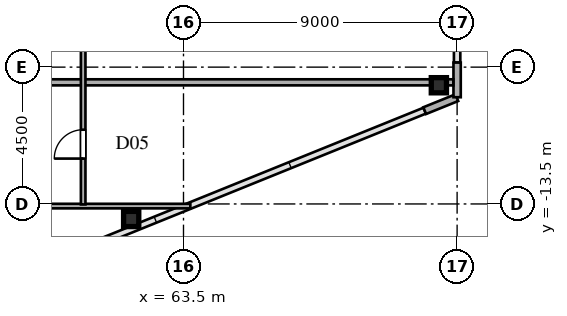
"""IFC4 building model, lengths in metres.
Left out: names, types, materials, properties, quantities, classifications, styles, units other than length and angle.
Written with IfcOpenShell. Run it as: python <this file> out.ifc"""

import sys

from ifc_helpers import new_model, si_unit, direction, frame, frame_2d, origin, origin_2d, place, context, subcontext, project, spatial, rectangle, hollow_rectangle, extrude, source, transform, mapped, element, fill, save


model = new_model("IFC4")
c1 = context("Model", 3, precision=1e-05, world=origin(), true_north=direction((0.0, 1.0)))
c2 = subcontext(c1, "Body", "Model", "MODEL_VIEW")
j1 = project(units=[si_unit("LENGTHUNIT", "METRE"), si_unit("PLANEANGLEUNIT", "RADIAN")], contexts=[c1])
p1 = place(None, origin())
s1 = spatial("IfcSite", under=j1, at=p1, CompositionType="ELEMENT")
p2 = place(p1, origin())
s2 = spatial("IfcBuilding", under=s1, at=p2, CompositionType="ELEMENT")
p3 = place(p2, frame((0.0, 0.0, 18.9)))
s3 = spatial("IfcBuildingStorey", under=s2, at=p3, CompositionType="ELEMENT", Elevation=18.9)
m1 = source(origin(), c2, "Body", "SweptSolid", [
    extrude(hollow_rectangle(XDim=0.5, YDim=0.5, WallThickness=0.02, at=origin_2d()), origin(), (0.0, 0.0, 1.0), 3.6),
])
for number, where, z_axis, x_axis in (
    (1, (71.9, -9.596, 0.0), (0.0, 0.0, 1.0), (1.0, 0.0, 0.0)),
    (2, (61.779, -13.994, 0.0), (0.0, 0.0, 1.0), (1.0, 0.0, 0.0)),
):
    element("IfcColumn", number, at=place(p3, frame(where, z_axis=z_axis, x_axis=x_axis)), inside=s3, PredefinedType="COLUMN", context=c2, shape_type="MappedRepresentation", body=[
        mapped(m1, transform((0.0, 0.0, 0.0), scale=1.0)),
    ])
for number, where, z_axis, x_axis in (
    (3, (71.434, -10.431, 0.0), (0.0, 0.0, 1.0), (0.927, 0.375, 0.0)),
    (4, (72.5, -9.99, 0.0), (0.0, 0.0, 1.0), (0.0, 1.0, 0.0)),
):
    element("IfcWall", number, at=place(p3, frame(where, z_axis=z_axis, x_axis=x_axis)), inside=s3, PredefinedType="SOLIDWALL", context=c2, shape_type="SweptSolid", body=[
        extrude(rectangle(XDim=1.14, YDim=0.24, at=frame_2d((0.57, 0.0))), origin(), (0.0, 0.0, 1.0), 3.38),
    ])
p4 = place(p3, frame((43.65, -13.57, 0.0), z_axis=(0.0, 0.0, 1.0), x_axis=(1.0, 0.0, 0.0)))
e5 = element("IfcWall", 5, at=p4, inside=s3, PredefinedType="PARTITIONING", context=c2, shape_type="SweptSolid", body=[
    extrude(rectangle(XDim=20.075, YDim=0.15, at=frame_2d((10.038, 0.0))), origin(), (0.0, 0.0, 1.0), 2.68),
])
p5 = place(p3, frame((39.53, -9.5, 0.0), z_axis=(0.0, 0.0, 1.0), x_axis=(1.0, 0.0, 0.0)))
e6 = element("IfcWall", 6, at=p5, inside=s3, PredefinedType="PARTITIONING", context=c2, shape_type="SweptSolid", body=[
    extrude(rectangle(XDim=32.845, YDim=0.2, at=frame_2d((16.422, 0.0))), origin(), (0.0, 0.0, 1.0), 3.38),
])
p6 = place(p3, frame((60.2, -13.516, 0.0), z_axis=(0.0, 0.0, 1.0), x_axis=(0.0, 1.0, 0.0)))
e7 = element("IfcWall", 7, at=p6, inside=s3, PredefinedType="PARTITIONING", context=c2, shape_type="SweptSolid", body=[
    extrude(rectangle(XDim=28.53, YDim=0.15, at=frame_2d((14.265, 0.0))), origin(), (0.0, 0.0, 1.0), 3.38),
])
p7 = place(p6, frame((1.508, 0.0, 0.0)))
e8 = element("IfcOpeningElement", 8, at=p7, cuts=e7, PredefinedType="OPENING", context=c2, shape_type="SweptSolid", body=[
    extrude(rectangle(XDim=0.95, YDim=2.15, at=frame_2d((0.475, 1.075))), frame((0.0, 0.085, 0.0), z_axis=(0.0, -1.0, 0.0), x_axis=(1.0, 0.0, 0.0)), (0.0, 0.0, 1.0), 0.17),
])
p8 = place(p6, frame((5.875, 0.0, 0.0)))
e9 = element("IfcOpeningElement", 9, at=p8, cuts=e7, PredefinedType="OPENING", context=c2, shape_type="SweptSolid", body=[
    extrude(rectangle(XDim=0.95, YDim=2.15, at=frame_2d((0.475, 1.075))), frame((0.0, 0.085, 0.0), z_axis=(0.0, -1.0, 0.0), x_axis=(1.0, 0.0, 0.0)), (0.0, 0.0, 1.0), 0.17),
])
p9 = place(p6, frame((10.541, 0.0, 0.0)))
e10 = element("IfcOpeningElement", 10, at=p9, cuts=e7, PredefinedType="OPENING", context=c2, shape_type="SweptSolid", body=[
    extrude(rectangle(XDim=0.95, YDim=2.15, at=frame_2d((0.475, 1.075))), frame((0.0, 0.085, 0.0), z_axis=(0.0, -1.0, 0.0), x_axis=(1.0, 0.0, 0.0)), (0.0, 0.0, 1.0), 0.17),
])
p10 = place(p6, frame((15.208, 0.0, 0.0)))
e11 = element("IfcOpeningElement", 11, at=p10, cuts=e7, PredefinedType="OPENING", context=c2, shape_type="SweptSolid", body=[
    extrude(rectangle(XDim=0.95, YDim=2.15, at=frame_2d((0.475, 1.075))), frame((0.0, 0.085, 0.0), z_axis=(0.0, -1.0, 0.0), x_axis=(1.0, 0.0, 0.0)), (0.0, 0.0, 1.0), 0.17),
])
p11 = place(p6, frame((20.407, 0.0, 0.0)))
e12 = element("IfcOpeningElement", 12, at=p11, cuts=e7, PredefinedType="OPENING", context=c2, shape_type="SweptSolid", body=[
    extrude(rectangle(XDim=0.95, YDim=2.15, at=frame_2d((0.475, 1.075))), frame((0.0, 0.085, 0.0), z_axis=(0.0, -1.0, 0.0), x_axis=(1.0, 0.0, 0.0)), (0.0, 0.0, 1.0), 0.17),
])
m2 = source(origin(), c2, "Body", "SweptSolid", [
    extrude(rectangle(XDim=0.95, YDim=2.15, at=frame_2d((0.475, 1.075))), frame((0.0, 0.025, 0.0), z_axis=(0.0, -1.0, 0.0), x_axis=(1.0, 0.0, 0.0)), (0.0, 0.0, 1.0), 0.05),
])
p12 = place(p7, origin())
e13 = element("IfcDoor", 13, at=p12, inside=s3, OperationType="SINGLE_SWING_LEFT", PredefinedType="DOOR", context=c2, shape_type="MappedRepresentation", body=[
    mapped(m2, transform((0.0, 0.0, 0.0), scale=1.0)),
])
fill(e8, e13)
save(model, sys.argv[1])
